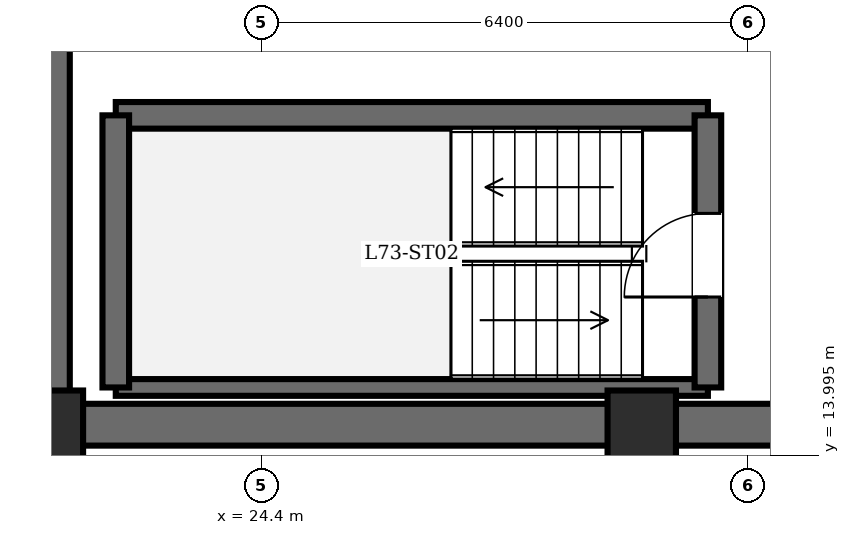
"""IFC4 building model, lengths in metres.
Left out: names, types, materials, properties, quantities, classifications, styles, units other than length and angle.
Written with IfcOpenShell. Run it as: python <this file> out.ifc"""

import sys

from ifc_helpers import new_model, si_unit, direction, frame, frame_2d, origin, origin_2d, place, context, subcontext, project, spatial, rectangle, extrude, element, fill, save


model = new_model("IFC4")
c1 = context("Model", 3, precision=1e-05, world=origin(), true_north=direction((0.0, 1.0)))
c2 = subcontext(c1, "Body", "Model", "MODEL_VIEW")
j1 = project(units=[si_unit("LENGTHUNIT", "METRE"), si_unit("PLANEANGLEUNIT", "RADIAN")], contexts=[c1])
p1 = place(None, origin())
s1 = spatial("IfcSite", under=j1, at=p1, CompositionType="ELEMENT")
p2 = place(p1, origin())
s2 = spatial("IfcBuilding", under=s1, at=p2, CompositionType="ELEMENT")
p3 = place(p2, frame((0.0, 0.0, 280.7)))
s3 = spatial("IfcBuildingStorey", under=s2, at=p3, CompositionType="ELEMENT", Elevation=280.7)
for number, where, z_axis, x_axis in (
    (1, (21.6, 14.4, 0.0), (0.0, 0.0, 1.0), (1.0, 0.0, 0.0)),
    (2, (29.4, 14.4, 0.0), (0.0, 0.0, 1.0), (1.0, 0.0, 0.0)),
):
    element("IfcColumn", number, at=place(p3, frame(where, z_axis=z_axis, x_axis=x_axis)), inside=s3, PredefinedType="COLUMN", context=c2, shape_type="SweptSolid", body=[
        extrude(rectangle(XDim=0.9, YDim=0.9, at=origin_2d()), origin(), (0.0, 0.0, 1.0), 3.65),
    ])
p4 = place(p3, frame((21.6, 14.4, 0.0), z_axis=(0.0, 0.0, 1.0), x_axis=(0.0, 1.0, 0.0)))
e3 = element("IfcWall", 3, at=p4, inside=s3, PredefinedType="SHEAR", context=c2, shape_type="SweptSolid", body=[
    extrude(rectangle(XDim=19.2, YDim=0.55, at=frame_2d((9.6, 0.0))), origin(), (0.0, 0.0, 1.0), 3.45),
])
p5 = place(p3, frame((37.2, 14.4, 0.0), z_axis=(0.0, 0.0, 1.0), x_axis=(-1.0, 0.0, 0.0)))
e4 = element("IfcWall", 4, at=p5, inside=s3, PredefinedType="SHEAR", context=c2, shape_type="SweptSolid", body=[
    extrude(rectangle(XDim=15.6, YDim=0.55, at=frame_2d((7.8, 0.0))), origin(), (0.0, 0.0, 1.0), 3.45),
])
p6 = place(p3, frame((22.48, 18.47, 0.0), z_axis=(0.0, 0.0, 1.0), x_axis=(1.0, 0.0, 0.0)))
e5 = element("IfcWall", 5, at=p6, inside=s3, PredefinedType="SOLIDWALL", context=c2, shape_type="SweptSolid", body=[
    extrude(rectangle(XDim=7.79, YDim=0.35, at=frame_2d((3.895, 0.0))), origin(), (0.0, 0.0, 1.0), 3.45),
])
p7 = place(p3, frame((22.48, 14.89, 0.0), z_axis=(0.0, 0.0, 1.0), x_axis=(1.0, 0.0, 0.0)))
e6 = element("IfcWall", 6, at=p7, inside=s3, PredefinedType="PARTITIONING", context=c2, shape_type="SweptSolid", body=[
    extrude(rectangle(XDim=7.79, YDim=0.22, at=frame_2d((3.895, 0.0))), origin(), (0.0, 0.0, 1.0), 3.45),
])
p8 = place(p3, frame((22.48, 14.89, 0.0), z_axis=(0.0, 0.0, 1.0), x_axis=(0.0, 1.0, 0.0)))
e7 = element("IfcWall", 7, at=p8, inside=s3, PredefinedType="SOLIDWALL", context=c2, shape_type="SweptSolid", body=[
    extrude(rectangle(XDim=3.58, YDim=0.35, at=frame_2d((1.79, 0.0))), origin(), (0.0, 0.0, 1.0), 3.45),
])
p9 = place(p3, frame((30.27, 14.89, 0.0), z_axis=(0.0, 0.0, 1.0), x_axis=(0.0, 1.0, 0.0)))
e8 = element("IfcWall", 8, at=p9, inside=s3, PredefinedType="SOLIDWALL", context=c2, shape_type="SweptSolid", body=[
    extrude(rectangle(XDim=3.58, YDim=0.35, at=frame_2d((1.79, 0.0))), origin(), (0.0, 0.0, 1.0), 3.45),
])
p10 = place(p9, frame((1.19, 0.0, 0.0)))
e9 = element("IfcOpeningElement", 9, at=p10, cuts=e8, PredefinedType="OPENING", context=c2, shape_type="SweptSolid", body=[
    extrude(rectangle(XDim=1.1, YDim=2.15, at=frame_2d((0.55, 1.075))), frame((0.0, 0.185, 0.0), z_axis=(0.0, -1.0, 0.0), x_axis=(1.0, 0.0, 0.0)), (0.0, 0.0, 1.0), 0.37),
])
p11 = place(p10, origin())
e10 = element("IfcDoor", 10, at=p11, inside=s3, OperationType="SINGLE_SWING_LEFT", PredefinedType="DOOR", context=c2, shape_type="SweptSolid", body=[
    extrude(rectangle(XDim=1.1, YDim=2.15, at=frame_2d((0.55, 1.075))), frame((0.0, 0.025, 0.0), z_axis=(0.0, -1.0, 0.0), x_axis=(1.0, 0.0, 0.0)), (0.0, 0.0, 1.0), 0.05),
])
fill(e9, e10)
save(model, sys.argv[1])
